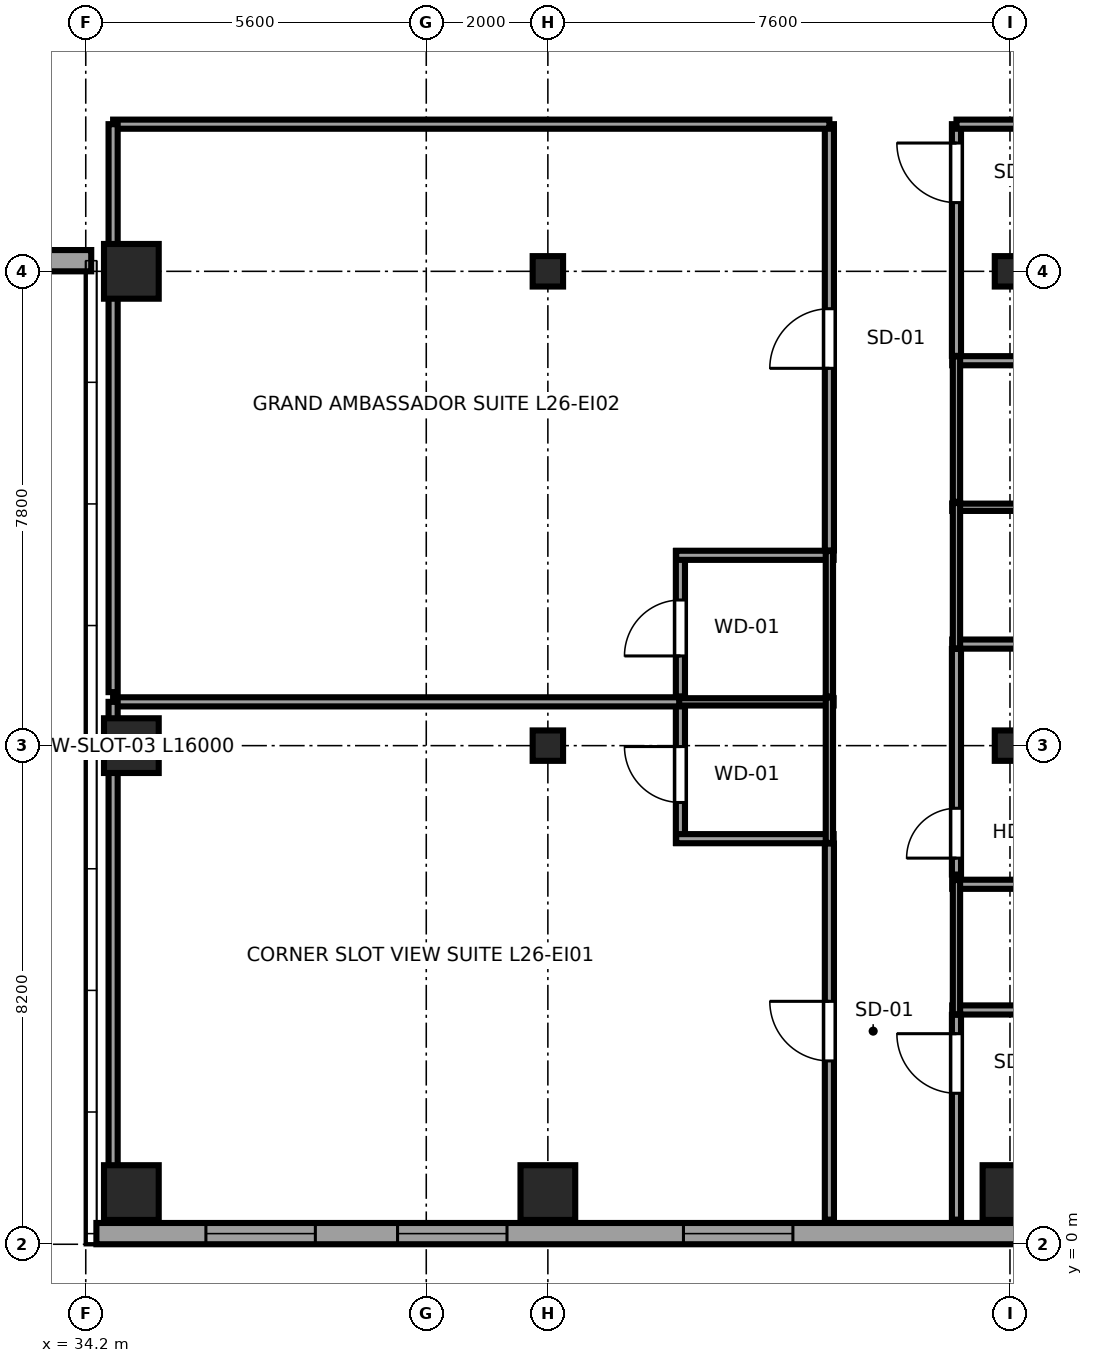
"""IFC4 building model, lengths in metres.
Left out: names, types, materials, properties, quantities, classifications, styles, units other than length and angle.
Written with IfcOpenShell. Run it as: python <this file> out.ifc"""

import sys

from ifc_helpers import new_model, si_unit, direction, frame, frame_2d, origin, origin_2d, place, context, subcontext, project, spatial, rectangle, i_section, extrude, source, transform, mapped, element, fill, save


model = new_model("IFC4")
c1 = context("Model", 3, precision=1e-05, world=origin(), true_north=direction((0.0, 1.0)))
c2 = subcontext(c1, "Body", "Model", "MODEL_VIEW")
j1 = project(units=[si_unit("LENGTHUNIT", "METRE"), si_unit("PLANEANGLEUNIT", "RADIAN")], contexts=[c1])
p1 = place(None, origin())
s1 = spatial("IfcSite", under=j1, at=p1, CompositionType="ELEMENT")
p2 = place(p1, origin())
s2 = spatial("IfcBuilding", under=s1, at=p2, CompositionType="ELEMENT")
p3 = place(p2, frame((0.0, 0.0, 104.45)))
s3 = spatial("IfcBuildingStorey", under=s2, at=p3, CompositionType="ELEMENT", Elevation=104.45)
m1 = source(origin(), c2, "Body", "SweptSolid", [
    extrude(rectangle(XDim=0.9, YDim=0.9, at=origin_2d()), origin(), (0.0, 0.0, 1.0), 3.55),
])
for number, where, z_axis, x_axis in (
    (1, (34.95, 0.85, 0.0), (0.0, 0.0, 1.0), (1.0, 0.0, 0.0)),
    (2, (34.95, 8.2, 0.0), (0.0, 0.0, 1.0), (1.0, 0.0, 0.0)),
    (3, (34.95, 16.0, 0.0), (0.0, 0.0, 1.0), (1.0, 0.0, 0.0)),
    (4, (41.8, 0.85, 0.0), (0.0, 0.0, 1.0), (1.0, 0.0, 0.0)),
):
    element("IfcColumn", number, at=place(p3, frame(where, z_axis=z_axis, x_axis=x_axis)), inside=s3, PredefinedType="COLUMN", context=c2, shape_type="MappedRepresentation", body=[
        mapped(m1, transform((0.0, 0.0, 0.0), x_axis=(1.0, 0.0, 0.0), y_axis=(0.0, 1.0, 0.0), z_axis=(0.0, 0.0, 1.0), scale=1.0)),
    ])
m2 = source(origin(), c2, "Body", "SweptSolid", [
    extrude(i_section(OverallWidth=0.5, OverallDepth=0.5, WebThickness=0.022, FlangeThickness=0.034, at=origin_2d()), origin(), (0.0, 0.0, 1.0), 3.55),
])
for number, where, z_axis, x_axis in (
    (5, (41.8, 8.2, 0.0), (0.0, 0.0, 1.0), (1.0, 0.0, 0.0)),
    (6, (41.8, 16.0, 0.0), (0.0, 0.0, 1.0), (1.0, 0.0, 0.0)),
):
    element("IfcColumn", number, at=place(p3, frame(where, z_axis=z_axis, x_axis=x_axis)), inside=s3, PredefinedType="COLUMN", context=c2, shape_type="MappedRepresentation", body=[
        mapped(m2, transform((0.0, 0.0, 0.0), x_axis=(1.0, 0.0, 0.0), y_axis=(0.0, 1.0, 0.0), z_axis=(0.0, 0.0, 1.0), scale=1.0)),
    ])
p4 = place(p3, frame((49.4, 0.85, 0.0), z_axis=(0.0, 0.0, 1.0), x_axis=(1.0, 0.0, 0.0)))
e7 = element("IfcColumn", 7, at=p4, inside=s3, PredefinedType="COLUMN", context=c2, shape_type="MappedRepresentation", body=[
    mapped(m1, transform((0.0, 0.0, 0.0), x_axis=(1.0, 0.0, 0.0), y_axis=(0.0, 1.0, 0.0), z_axis=(0.0, 0.0, 1.0), scale=1.0)),
])
for number, where, z_axis, x_axis in (
    (8, (49.4, 8.2, 0.0), (0.0, 0.0, 1.0), (1.0, 0.0, 0.0)),
    (9, (49.4, 16.0, 0.0), (0.0, 0.0, 1.0), (1.0, 0.0, 0.0)),
):
    element("IfcColumn", number, at=place(p3, frame(where, z_axis=z_axis, x_axis=x_axis)), inside=s3, PredefinedType="COLUMN", context=c2, shape_type="MappedRepresentation", body=[
        mapped(m2, transform((0.0, 0.0, 0.0), x_axis=(1.0, 0.0, 0.0), y_axis=(0.0, 1.0, 0.0), z_axis=(0.0, 0.0, 1.0), scale=1.0)),
    ])
p5 = place(p3, frame((22.71, 16.175, 0.0), z_axis=(0.0, 0.0, 1.0), x_axis=(1.0, 0.0, 0.0)))
e10 = element("IfcWall", 10, at=p5, inside=s3, PredefinedType="SOLIDWALL", context=c2, shape_type="SweptSolid", body=[
    extrude(rectangle(XDim=11.58, YDim=0.35, at=frame_2d((5.79, 0.0))), origin(), (0.0, 0.0, 1.0), 2.748),
])
p6 = place(p5, frame((2.295, 0.0, 0.68)))
e11 = element("IfcOpeningElement", 11, at=p6, cuts=e10, PredefinedType="OPENING", context=c2, shape_type="SweptSolid", body=[
    extrude(rectangle(XDim=1.8, YDim=1.85, at=frame_2d((0.9, 0.925))), frame((0.0, 0.185, 0.0), z_axis=(0.0, -1.0, 0.0), x_axis=(1.0, 0.0, 0.0)), (0.0, 0.0, 1.0), 0.37),
])
p7 = place(p5, frame((7.485, 0.0, 0.68)))
e12 = element("IfcOpeningElement", 12, at=p7, cuts=e10, PredefinedType="OPENING", context=c2, shape_type="SweptSolid", body=[
    extrude(rectangle(XDim=1.8, YDim=1.85, at=frame_2d((0.9, 0.925))), frame((0.0, 0.185, 0.0), z_axis=(0.0, -1.0, 0.0), x_axis=(1.0, 0.0, 0.0)), (0.0, 0.0, 1.0), 0.37),
])
p8 = place(p3, frame((34.375, 0.175, 0.0), z_axis=(0.0, 0.0, 1.0), x_axis=(1.0, 0.0, 0.0)))
e13 = element("IfcWall", 13, at=p8, inside=s3, PredefinedType="SOLIDWALL", context=c2, shape_type="SweptSolid", body=[
    extrude(rectangle(XDim=18.008, YDim=0.35, at=frame_2d((9.004, 0.0))), origin(), (0.0, 0.0, 1.0), 3.37),
])
p9 = place(p8, frame((1.801, 0.0, 0.68)))
e14 = element("IfcOpeningElement", 14, at=p9, cuts=e13, PredefinedType="OPENING", context=c2, shape_type="SweptSolid", body=[
    extrude(rectangle(XDim=1.8, YDim=1.85, at=frame_2d((0.9, 0.925))), frame((0.0, 0.185, 0.0), z_axis=(0.0, -1.0, 0.0), x_axis=(1.0, 0.0, 0.0)), (0.0, 0.0, 1.0), 0.37),
])
p10 = place(p8, frame((4.953, 0.0, 0.68)))
e15 = element("IfcOpeningElement", 15, at=p10, cuts=e13, PredefinedType="OPENING", context=c2, shape_type="SweptSolid", body=[
    extrude(rectangle(XDim=1.8, YDim=1.85, at=frame_2d((0.9, 0.925))), frame((0.0, 0.185, 0.0), z_axis=(0.0, -1.0, 0.0), x_axis=(1.0, 0.0, 0.0)), (0.0, 0.0, 1.0), 0.37),
])
p11 = place(p8, frame((9.655, 0.0, 0.68)))
e16 = element("IfcOpeningElement", 16, at=p11, cuts=e13, PredefinedType="OPENING", context=c2, shape_type="SweptSolid", body=[
    extrude(rectangle(XDim=1.8, YDim=1.85, at=frame_2d((0.9, 0.925))), frame((0.0, 0.185, 0.0), z_axis=(0.0, -1.0, 0.0), x_axis=(1.0, 0.0, 0.0)), (0.0, 0.0, 1.0), 0.37),
])
p12 = place(p8, frame((15.241, 0.0, 0.62)))
e17 = element("IfcOpeningElement", 17, at=p12, cuts=e13, PredefinedType="OPENING", context=c2, shape_type="SweptSolid", body=[
    extrude(rectangle(XDim=1.5, YDim=1.55, at=frame_2d((0.75, 0.775))), frame((0.0, 0.185, 0.0), z_axis=(0.0, -1.0, 0.0), x_axis=(1.0, 0.0, 0.0)), (0.0, 0.0, 1.0), 0.37),
])
p13 = place(p3, frame((43.98, 6.6, 0.0), z_axis=(0.0, 0.0, 1.0), x_axis=(0.0, 1.0, 0.0)))
e18 = element("IfcWall", 18, at=p13, inside=s3, PredefinedType="PARTITIONING", context=c2, shape_type="SweptSolid", body=[
    extrude(rectangle(XDim=2.39, YDim=0.15, at=frame_2d((1.195, 0.0))), origin(), (0.0, 0.0, 1.0), 3.37),
])
p14 = place(p13, frame((0.665, 0.0, 0.0)))
e19 = element("IfcOpeningElement", 19, at=p14, cuts=e18, PredefinedType="OPENING", context=c2, shape_type="SweptSolid", body=[
    extrude(rectangle(XDim=0.92, YDim=2.01, at=frame_2d((0.46, 1.005))), frame((0.0, 0.085, 0.0), z_axis=(0.0, -1.0, 0.0), x_axis=(1.0, 0.0, 0.0)), (0.0, 0.0, 1.0), 0.17),
])
p15 = place(p3, frame((43.91, 6.67, 0.0), z_axis=(0.0, 0.0, 1.0), x_axis=(1.0, 0.0, 0.0)))
e20 = element("IfcWall", 20, at=p15, inside=s3, PredefinedType="PARTITIONING", context=c2, shape_type="SweptSolid", body=[
    extrude(rectangle(XDim=2.59, YDim=0.15, at=frame_2d((1.295, 0.0))), origin(), (0.0, 0.0, 1.0), 3.37),
])
p16 = place(p3, frame((43.91, 8.92, 0.0), z_axis=(0.0, 0.0, 1.0), x_axis=(1.0, 0.0, 0.0)))
e21 = element("IfcWall", 21, at=p16, inside=s3, PredefinedType="PLUMBINGWALL", context=c2, shape_type="SweptSolid", body=[
    extrude(rectangle(XDim=2.59, YDim=0.12, at=frame_2d((1.295, 0.0))), origin(), (0.0, 0.0, 1.0), 3.37),
])
p17 = place(p3, frame((46.43, 6.6, 0.0), z_axis=(0.0, 0.0, 1.0), x_axis=(0.0, 1.0, 0.0)))
e22 = element("IfcWall", 22, at=p17, inside=s3, PredefinedType="PLUMBINGWALL", context=c2, shape_type="SweptSolid", body=[
    extrude(rectangle(XDim=2.39, YDim=0.12, at=frame_2d((1.195, 0.0))), origin(), (0.0, 0.0, 1.0), 3.37),
])
p18 = place(p3, frame((43.98, 9.01, 0.0), z_axis=(0.0, 0.0, 1.0), x_axis=(0.0, 1.0, 0.0)))
e23 = element("IfcWall", 23, at=p18, inside=s3, PredefinedType="PARTITIONING", context=c2, shape_type="SweptSolid", body=[
    extrude(rectangle(XDim=2.39, YDim=0.15, at=frame_2d((1.195, 0.0))), origin(), (0.0, 0.0, 1.0), 3.37),
])
p19 = place(p18, frame((0.665, 0.0, 0.0)))
e24 = element("IfcOpeningElement", 24, at=p19, cuts=e23, PredefinedType="OPENING", context=c2, shape_type="SweptSolid", body=[
    extrude(rectangle(XDim=0.92, YDim=2.01, at=frame_2d((0.46, 1.005))), frame((0.0, 0.085, 0.0), z_axis=(0.0, -1.0, 0.0), x_axis=(1.0, 0.0, 0.0)), (0.0, 0.0, 1.0), 0.17),
])
p20 = place(p3, frame((43.91, 11.33, 0.0), z_axis=(0.0, 0.0, 1.0), x_axis=(1.0, 0.0, 0.0)))
e25 = element("IfcWall", 25, at=p20, inside=s3, PredefinedType="PARTITIONING", context=c2, shape_type="SweptSolid", body=[
    extrude(rectangle(XDim=2.59, YDim=0.15, at=frame_2d((1.295, 0.0))), origin(), (0.0, 0.0, 1.0), 3.37),
])
p21 = place(p3, frame((46.43, 9.01, 0.0), z_axis=(0.0, 0.0, 1.0), x_axis=(0.0, 1.0, 0.0)))
e26 = element("IfcWall", 26, at=p21, inside=s3, PredefinedType="PLUMBINGWALL", context=c2, shape_type="SweptSolid", body=[
    extrude(rectangle(XDim=2.39, YDim=0.12, at=frame_2d((1.195, 0.0))), origin(), (0.0, 0.0, 1.0), 3.37),
])
for number, where, z_axis, x_axis in (
    (27, (48.45, 3.853, 0.0), (0.0, 0.0, 1.0), (1.0, 0.0, 0.0)),
    (28, (48.45, 5.92, 0.0), (0.0, 0.0, 1.0), (1.0, 0.0, 0.0)),
):
    element("IfcWall", number, at=place(p3, frame(where, z_axis=z_axis, x_axis=x_axis)), inside=s3, PredefinedType="PARTITIONING", context=c2, shape_type="SweptSolid", body=[
        extrude(rectangle(XDim=2.59, YDim=0.15, at=frame_2d((1.295, 0.0))), origin(), (0.0, 0.0, 1.0), 3.37),
    ])
p22 = place(p3, frame((48.52, 3.783, 0.0), z_axis=(0.0, 0.0, 1.0), x_axis=(0.0, 1.0, 0.0)))
e29 = element("IfcWall", 29, at=p22, inside=s3, PredefinedType="PLUMBINGWALL", context=c2, shape_type="SweptSolid", body=[
    extrude(rectangle(XDim=2.207, YDim=0.12, at=frame_2d((1.104, 0.0))), origin(), (0.0, 0.0, 1.0), 3.37),
])
p23 = place(p3, frame((48.45, 9.87, 0.0), z_axis=(0.0, 0.0, 1.0), x_axis=(1.0, 0.0, 0.0)))
e30 = element("IfcWall", 30, at=p23, inside=s3, PredefinedType="PARTITIONING", context=c2, shape_type="SweptSolid", body=[
    extrude(rectangle(XDim=2.59, YDim=0.15, at=frame_2d((1.295, 0.0))), origin(), (0.0, 0.0, 1.0), 3.37),
])
p24 = place(p3, frame((48.45, 12.12, 0.0), z_axis=(0.0, 0.0, 1.0), x_axis=(1.0, 0.0, 0.0)))
e31 = element("IfcWall", 31, at=p24, inside=s3, PredefinedType="PLUMBINGWALL", context=c2, shape_type="SweptSolid", body=[
    extrude(rectangle(XDim=2.59, YDim=0.12, at=frame_2d((1.295, 0.0))), origin(), (0.0, 0.0, 1.0), 3.37),
])
p25 = place(p3, frame((48.52, 9.8, 0.0), z_axis=(0.0, 0.0, 1.0), x_axis=(0.0, 1.0, 0.0)))
e32 = element("IfcWall", 32, at=p25, inside=s3, PredefinedType="PLUMBINGWALL", context=c2, shape_type="SweptSolid", body=[
    extrude(rectangle(XDim=2.39, YDim=0.12, at=frame_2d((1.195, 0.0))), origin(), (0.0, 0.0, 1.0), 3.37),
])
p26 = place(p3, frame((48.45, 14.53, 0.0), z_axis=(0.0, 0.0, 1.0), x_axis=(1.0, 0.0, 0.0)))
e33 = element("IfcWall", 33, at=p26, inside=s3, PredefinedType="PARTITIONING", context=c2, shape_type="SweptSolid", body=[
    extrude(rectangle(XDim=2.59, YDim=0.15, at=frame_2d((1.295, 0.0))), origin(), (0.0, 0.0, 1.0), 3.37),
])
p27 = place(p3, frame((48.52, 12.21, 0.0), z_axis=(0.0, 0.0, 1.0), x_axis=(0.0, 1.0, 0.0)))
e34 = element("IfcWall", 34, at=p27, inside=s3, PredefinedType="PLUMBINGWALL", context=c2, shape_type="SweptSolid", body=[
    extrude(rectangle(XDim=2.39, YDim=0.12, at=frame_2d((1.195, 0.0))), origin(), (0.0, 0.0, 1.0), 3.37),
])
p28 = place(p3, frame((46.43, 0.405, 0.0), z_axis=(0.0, 0.0, 1.0), x_axis=(0.0, 1.0, 0.0)))
e35 = element("IfcWall", 35, at=p28, inside=s3, PredefinedType="PARTITIONING", context=c2, shape_type="SweptSolid", body=[
    extrude(rectangle(XDim=6.185, YDim=0.15, at=frame_2d((3.093, 0.0))), origin(), (0.0, 0.0, 1.0), 3.37),
])
p29 = place(p28, frame((2.61, 0.0, 0.0)))
e36 = element("IfcOpeningElement", 36, at=p29, cuts=e35, PredefinedType="OPENING", context=c2, shape_type="SweptSolid", body=[
    extrude(rectangle(XDim=0.98, YDim=2.12, at=frame_2d((0.49, 1.06))), frame((0.0, 0.085, 0.0), z_axis=(0.0, -1.0, 0.0), x_axis=(1.0, 0.0, 0.0)), (0.0, 0.0, 1.0), 0.17),
])
p30 = place(p3, frame((34.65, 8.92, 0.0), z_axis=(0.0, 0.0, 1.0), x_axis=(1.0, 0.0, 0.0)))
e37 = element("IfcWall", 37, at=p30, inside=s3, PredefinedType="PARTITIONING", context=c2, shape_type="SweptSolid", body=[
    extrude(rectangle(XDim=9.31, YDim=0.15, at=frame_2d((4.655, 0.0))), origin(), (0.0, 0.0, 1.0), 3.37),
])
p31 = place(p3, frame((34.65, 0.405, 0.0), z_axis=(0.0, 0.0, 1.0), x_axis=(0.0, 1.0, 0.0)))
e38 = element("IfcWall", 38, at=p31, inside=s3, PredefinedType="PARTITIONING", context=c2, shape_type="SweptSolid", body=[
    extrude(rectangle(XDim=8.515, YDim=0.15, at=frame_2d((4.257, 0.0))), origin(), (0.0, 0.0, 1.0), 3.37),
])
p32 = place(p3, frame((46.43, 11.41, 0.0), z_axis=(0.0, 0.0, 1.0), x_axis=(0.0, 1.0, 0.0)))
e39 = element("IfcWall", 39, at=p32, inside=s3, PredefinedType="PARTITIONING", context=c2, shape_type="SweptSolid", body=[
    extrude(rectangle(XDim=7.01, YDim=0.15, at=frame_2d((3.505, 0.0))), origin(), (0.0, 0.0, 1.0), 3.37),
])
p33 = place(p32, frame((2.995, 0.0, 0.0)))
e40 = element("IfcOpeningElement", 40, at=p33, cuts=e39, PredefinedType="OPENING", context=c2, shape_type="SweptSolid", body=[
    extrude(rectangle(XDim=0.98, YDim=2.12, at=frame_2d((0.49, 1.06))), frame((0.0, 0.085, 0.0), z_axis=(0.0, -1.0, 0.0), x_axis=(1.0, 0.0, 0.0)), (0.0, 0.0, 1.0), 0.17),
])
p34 = place(p3, frame((34.65, 18.42, 0.0), z_axis=(0.0, 0.0, 1.0), x_axis=(1.0, 0.0, 0.0)))
e41 = element("IfcWall", 41, at=p34, inside=s3, PredefinedType="PARTITIONING", context=c2, shape_type="SweptSolid", body=[
    extrude(rectangle(XDim=11.78, YDim=0.15, at=frame_2d((5.89, 0.0))), origin(), (0.0, 0.0, 1.0), 3.37),
])
p35 = place(p3, frame((34.65, 9.08, 0.0), z_axis=(0.0, 0.0, 1.0), x_axis=(0.0, 1.0, 0.0)))
e42 = element("IfcWall", 42, at=p35, inside=s3, PredefinedType="PARTITIONING", context=c2, shape_type="SweptSolid", body=[
    extrude(rectangle(XDim=9.34, YDim=0.15, at=frame_2d((4.67, 0.0))), origin(), (0.0, 0.0, 1.0), 3.37),
])
p36 = place(p3, frame((48.52, 0.405, 0.0), z_axis=(0.0, 0.0, 1.0), x_axis=(0.0, 1.0, 0.0)))
e43 = element("IfcWall", 43, at=p36, inside=s3, PredefinedType="PARTITIONING", context=c2, shape_type="SweptSolid", body=[
    extrude(rectangle(XDim=3.368, YDim=0.15, at=frame_2d((1.684, 0.0))), origin(), (0.0, 0.0, 1.0), 3.37),
])
p37 = place(p36, frame((2.078, 0.0, 0.0)))
e44 = element("IfcOpeningElement", 44, at=p37, cuts=e43, PredefinedType="OPENING", context=c2, shape_type="SweptSolid", body=[
    extrude(rectangle(XDim=0.98, YDim=2.12, at=frame_2d((0.49, 1.06))), frame((0.0, 0.085, 0.0), z_axis=(0.0, -1.0, 0.0), x_axis=(1.0, 0.0, 0.0)), (0.0, 0.0, 1.0), 0.17),
])
p38 = place(p3, frame((48.52, 6.08, 0.0), z_axis=(0.0, 0.0, 1.0), x_axis=(0.0, 1.0, 0.0)))
e45 = element("IfcWall", 45, at=p38, inside=s3, PredefinedType="PARTITIONING", context=c2, shape_type="SweptSolid", body=[
    extrude(rectangle(XDim=3.71, YDim=0.15, at=frame_2d((1.855, 0.0))), origin(), (0.0, 0.0, 1.0), 3.37),
])
p39 = place(p38, frame((0.27, 0.0, 0.0)))
e46 = element("IfcOpeningElement", 46, at=p39, cuts=e45, PredefinedType="OPENING", context=c2, shape_type="SweptSolid", body=[
    extrude(rectangle(XDim=0.82, YDim=2.01, at=frame_2d((0.41, 1.005))), frame((0.0, 0.085, 0.0), z_axis=(0.0, -1.0, 0.0), x_axis=(1.0, 0.0, 0.0)), (0.0, 0.0, 1.0), 0.17),
])
p40 = place(p3, frame((48.52, 14.61, 0.0), z_axis=(0.0, 0.0, 1.0), x_axis=(0.0, 1.0, 0.0)))
e47 = element("IfcWall", 47, at=p40, inside=s3, PredefinedType="PARTITIONING", context=c2, shape_type="SweptSolid", body=[
    extrude(rectangle(XDim=3.81, YDim=0.15, at=frame_2d((1.905, 0.0))), origin(), (0.0, 0.0, 1.0), 3.37),
])
p41 = place(p40, frame((2.52, 0.0, 0.0)))
e48 = element("IfcOpeningElement", 48, at=p41, cuts=e47, PredefinedType="OPENING", context=c2, shape_type="SweptSolid", body=[
    extrude(rectangle(XDim=0.98, YDim=2.12, at=frame_2d((0.49, 1.06))), frame((0.0, 0.085, 0.0), z_axis=(0.0, -1.0, 0.0), x_axis=(1.0, 0.0, 0.0)), (0.0, 0.0, 1.0), 0.17),
])
p42 = place(p3, frame((48.52, 18.42, 0.0), z_axis=(0.0, 0.0, 1.0), x_axis=(1.0, 0.0, 0.0)))
e49 = element("IfcWall", 49, at=p42, inside=s3, PredefinedType="PARTITIONING", context=c2, shape_type="SweptSolid", body=[
    extrude(rectangle(XDim=8.075, YDim=0.15, at=frame_2d((4.038, 0.0))), origin(), (0.0, 0.0, 1.0), 3.37),
])
m3 = source(origin(), c2, "Body", "SweptSolid", [
    extrude(rectangle(XDim=1.8, YDim=1.85, at=frame_2d((0.9, 0.925))), frame((0.0, 0.09, 0.0), z_axis=(0.0, -1.0, 0.0), x_axis=(1.0, 0.0, 0.0)), (0.0, 0.0, 1.0), 0.06),
])
p43 = place(p9, origin())
e50 = element("IfcWindow", 50, at=p43, inside=s3, PartitioningType="TRIPLE_PANEL_HORIZONTAL", PredefinedType="WINDOW", context=c2, shape_type="MappedRepresentation", body=[
    mapped(m3, transform((0.0, 0.0, 0.0), x_axis=(1.0, 0.0, 0.0), y_axis=(0.0, 1.0, 0.0), z_axis=(0.0, 0.0, 1.0), scale=1.0)),
])
fill(e14, e50)
p44 = place(p10, origin())
e51 = element("IfcWindow", 51, at=p44, inside=s3, PartitioningType="TRIPLE_PANEL_HORIZONTAL", PredefinedType="WINDOW", context=c2, shape_type="MappedRepresentation", body=[
    mapped(m3, transform((0.0, 0.0, 0.0), x_axis=(1.0, 0.0, 0.0), y_axis=(0.0, 1.0, 0.0), z_axis=(0.0, 0.0, 1.0), scale=1.0)),
])
fill(e15, e51)
p45 = place(p11, origin())
e52 = element("IfcWindow", 52, at=p45, inside=s3, PartitioningType="TRIPLE_PANEL_HORIZONTAL", PredefinedType="WINDOW", context=c2, shape_type="MappedRepresentation", body=[
    mapped(m3, transform((0.0, 0.0, 0.0), x_axis=(1.0, 0.0, 0.0), y_axis=(0.0, 1.0, 0.0), z_axis=(0.0, 0.0, 1.0), scale=1.0)),
])
fill(e16, e52)
m4 = source(origin(), c2, "Body", "SweptSolid", [
    extrude(rectangle(XDim=0.92, YDim=2.01, at=frame_2d((0.46, 1.005))), frame((0.0, 0.025, 0.0), z_axis=(0.0, -1.0, 0.0), x_axis=(1.0, 0.0, 0.0)), (0.0, 0.0, 1.0), 0.05),
])
p46 = place(p14, origin())
e53 = element("IfcDoor", 53, at=p46, inside=s3, OperationType="SINGLE_SWING_RIGHT", PredefinedType="DOOR", context=c2, shape_type="MappedRepresentation", body=[
    mapped(m4, transform((0.0, 0.0, 0.0), x_axis=(1.0, 0.0, 0.0), y_axis=(0.0, 1.0, 0.0), z_axis=(0.0, 0.0, 1.0), scale=1.0)),
])
fill(e19, e53)
p47 = place(p19, origin())
e54 = element("IfcDoor", 54, at=p47, inside=s3, OperationType="SINGLE_SWING_LEFT", PredefinedType="DOOR", context=c2, shape_type="MappedRepresentation", body=[
    mapped(m4, transform((0.0, 0.0, 0.0), x_axis=(1.0, 0.0, 0.0), y_axis=(0.0, 1.0, 0.0), z_axis=(0.0, 0.0, 1.0), scale=1.0)),
])
fill(e24, e54)
m5 = source(origin(), c2, "Body", "SweptSolid", [
    extrude(rectangle(XDim=0.98, YDim=2.12, at=frame_2d((0.49, 1.06))), frame((0.0, 0.025, 0.0), z_axis=(0.0, -1.0, 0.0), x_axis=(1.0, 0.0, 0.0)), (0.0, 0.0, 1.0), 0.05),
])
p48 = place(p29, origin())
e55 = element("IfcDoor", 55, at=p48, inside=s3, OperationType="SINGLE_SWING_RIGHT", PredefinedType="DOOR", context=c2, shape_type="MappedRepresentation", body=[
    mapped(m5, transform((0.0, 0.0, 0.0), x_axis=(1.0, 0.0, 0.0), y_axis=(0.0, 1.0, 0.0), z_axis=(0.0, 0.0, 1.0), scale=1.0)),
])
fill(e36, e55)
p49 = place(p33, origin())
e56 = element("IfcDoor", 56, at=p49, inside=s3, OperationType="SINGLE_SWING_LEFT", PredefinedType="DOOR", context=c2, shape_type="MappedRepresentation", body=[
    mapped(m5, transform((0.0, 0.0, 0.0), x_axis=(1.0, 0.0, 0.0), y_axis=(0.0, 1.0, 0.0), z_axis=(0.0, 0.0, 1.0), scale=1.0)),
])
fill(e40, e56)
p50 = place(p37, origin())
e57 = element("IfcDoor", 57, at=p50, inside=s3, OperationType="SINGLE_SWING_RIGHT", PredefinedType="DOOR", context=c2, shape_type="MappedRepresentation", body=[
    mapped(m5, transform((0.0, 0.0, 0.0), x_axis=(1.0, 0.0, 0.0), y_axis=(0.0, 1.0, 0.0), z_axis=(0.0, 0.0, 1.0), scale=1.0)),
])
fill(e44, e57)
m6 = source(origin(), c2, "Body", "SweptSolid", [
    extrude(rectangle(XDim=0.82, YDim=2.01, at=frame_2d((0.41, 1.005))), frame((0.0, 0.025, 0.0), z_axis=(0.0, -1.0, 0.0), x_axis=(1.0, 0.0, 0.0)), (0.0, 0.0, 1.0), 0.05),
])
p51 = place(p39, origin())
e58 = element("IfcDoor", 58, at=p51, inside=s3, OperationType="SINGLE_SWING_LEFT", PredefinedType="DOOR", context=c2, shape_type="MappedRepresentation", body=[
    mapped(m6, transform((0.0, 0.0, 0.0), x_axis=(1.0, 0.0, 0.0), y_axis=(0.0, 1.0, 0.0), z_axis=(0.0, 0.0, 1.0), scale=1.0)),
])
fill(e46, e58)
p52 = place(p41, origin())
e59 = element("IfcDoor", 59, at=p52, inside=s3, OperationType="SINGLE_SWING_RIGHT", PredefinedType="DOOR", context=c2, shape_type="MappedRepresentation", body=[
    mapped(m5, transform((0.0, 0.0, 0.0), x_axis=(1.0, 0.0, 0.0), y_axis=(0.0, 1.0, 0.0), z_axis=(0.0, 0.0, 1.0), scale=1.0)),
])
fill(e48, e59)
save(model, sys.argv[1])
